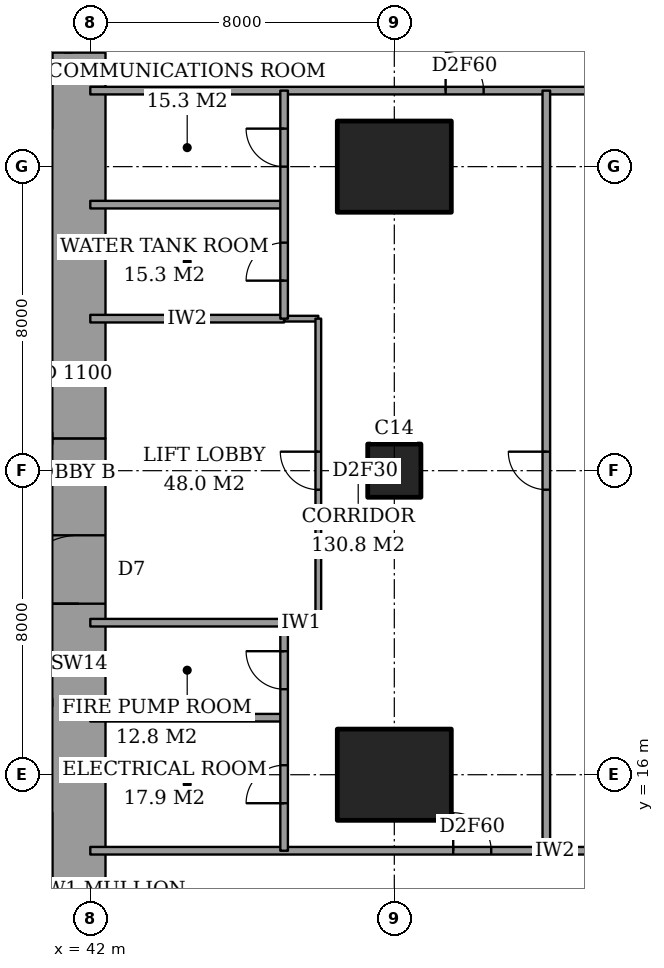
"""IFC4 building model, lengths in metres.
Left out: names, types, materials, properties, quantities, classifications, styles, units other than length and angle.
Written with IfcOpenShell. Run it as: python <this file> out.ifc"""

import sys

from ifc_helpers import new_model, si_unit, direction, frame, frame_2d, origin, origin_2d, place, context, subcontext, project, spatial, rectangle, extrude, element, fill, save


model = new_model("IFC4")
c1 = context("Model", 3, precision=1e-05, world=origin(), true_north=direction((0.0, 1.0)))
c2 = subcontext(c1, "Body", "Model", "MODEL_VIEW")
j1 = project(units=[si_unit("LENGTHUNIT", "METRE"), si_unit("PLANEANGLEUNIT", "RADIAN")], contexts=[c1])
p1 = place(None, origin())
s1 = spatial("IfcSite", under=j1, at=p1, CompositionType="ELEMENT")
p2 = place(p1, origin())
s2 = spatial("IfcBuilding", under=s1, at=p2, CompositionType="ELEMENT")
p3 = place(p2, frame((0.0, 0.0, 296.6)))
s3 = spatial("IfcBuildingStorey", under=s2, at=p3, CompositionType="ELEMENT", Elevation=296.6)
p4 = place(p3, frame((50.0, 16.0, 0.0), z_axis=(0.0, 0.0, 1.0), x_axis=(1.0, 0.0, 0.0)))
e1 = element("IfcColumn", 1, at=p4, inside=s3, PredefinedType="COLUMN", context=c2, shape_type="SweptSolid", body=[
    extrude(rectangle(XDim=3.0, YDim=2.4, at=origin_2d()), origin(), (0.0, 0.0, 1.0), 5.0),
])
p5 = place(p3, frame((50.0, 24.0, 0.0), z_axis=(0.0, 0.0, 1.0), x_axis=(1.0, 0.0, 0.0)))
e2 = element("IfcColumn", 2, at=p5, inside=s3, PredefinedType="COLUMN", context=c2, shape_type="SweptSolid", body=[
    extrude(rectangle(XDim=1.4, YDim=1.4, at=origin_2d()), origin(), (0.0, 0.0, 1.0), 5.0),
])
p6 = place(p3, frame((50.0, 32.0, 0.0), z_axis=(0.0, 0.0, 1.0), x_axis=(1.0, 0.0, 0.0)))
e3 = element("IfcColumn", 3, at=p6, inside=s3, PredefinedType="COLUMN", context=c2, shape_type="SweptSolid", body=[
    extrude(rectangle(XDim=3.0, YDim=2.4, at=origin_2d()), origin(), (0.0, 0.0, 1.0), 5.0),
])
p7 = place(p3, frame((41.7, 13.0, 0.0), z_axis=(0.0, 0.0, 1.0), x_axis=(0.0, 1.0, 0.0)))
e4 = element("IfcWall", 4, at=p7, inside=s3, PredefinedType="SHEAR", context=c2, shape_type="SweptSolid", body=[
    extrude(rectangle(XDim=11.85, YDim=1.4, at=frame_2d((5.925, 0.0))), origin(), (0.0, 0.0, 1.0), 5.0),
])
p8 = place(p7, frame((7.5, 0.0, 0.0)))
e5 = element("IfcOpeningElement", 5, at=p8, cuts=e4, PredefinedType="OPENING", context=c2, shape_type="SweptSolid", body=[
    extrude(rectangle(XDim=1.8, YDim=2.4, at=frame_2d((0.9, 1.2))), frame((0.0, 0.71, 0.0), z_axis=(0.0, -1.0, 0.0), x_axis=(1.0, 0.0, 0.0)), (0.0, 0.0, 1.0), 1.42),
])
p9 = place(p3, frame((41.7, 24.85, 0.0), z_axis=(0.0, 0.0, 1.0), x_axis=(0.0, 1.0, 0.0)))
e6 = element("IfcWall", 6, at=p9, inside=s3, PredefinedType="SHEAR", context=c2, shape_type="SweptSolid", body=[
    extrude(rectangle(XDim=10.15, YDim=1.4, at=frame_2d((5.075, 0.0))), origin(), (0.0, 0.0, 1.0), 5.0),
])
p10 = place(p3, frame((42.0, 14.0, 0.0), z_axis=(0.0, 0.0, 1.0), x_axis=(1.0, 0.0, 0.0)))
e7 = element("IfcWall", 7, at=p10, inside=s3, PredefinedType="PARTITIONING", context=c2, shape_type="SweptSolid", body=[
    extrude(rectangle(XDim=24.45, YDim=0.2, at=frame_2d((12.225, 0.0))), origin(), (0.0, 0.0, 1.0), 4.7),
])
p11 = place(p10, frame((9.55, 0.0, 0.0)))
e8 = element("IfcOpeningElement", 8, at=p11, cuts=e7, PredefinedType="OPENING", context=c2, shape_type="SweptSolid", body=[
    extrude(rectangle(XDim=1.0, YDim=2.1, at=frame_2d((0.5, 1.05))), frame((0.0, 0.11, 0.0), z_axis=(0.0, -1.0, 0.0), x_axis=(1.0, 0.0, 0.0)), (0.0, 0.0, 1.0), 0.22),
])
for number, where, z_axis, x_axis in (
    (9, (42.0, 17.5, 0.0), (0.0, 0.0, 1.0), (1.0, 0.0, 0.0)),
    (10, (42.0, 20.0, 0.0), (0.0, 0.0, 1.0), (1.0, 0.0, 0.0)),
):
    element("IfcWall", number, at=place(p3, frame(where, z_axis=z_axis, x_axis=x_axis)), inside=s3, PredefinedType="PARTITIONING", context=c2, shape_type="SweptSolid", body=[
        extrude(rectangle(XDim=5.1, YDim=0.2, at=frame_2d((2.55, 0.0))), origin(), (0.0, 0.0, 1.0), 4.7),
    ])
p12 = place(p3, frame((47.1, 20.0, 0.0), z_axis=(0.0, 0.0, 1.0), x_axis=(1.0, 0.0, 0.0)))
e11 = element("IfcWall", 11, at=p12, inside=s3, PredefinedType="PARTITIONING", context=c2, shape_type="SweptSolid", body=[
    extrude(rectangle(XDim=0.9, YDim=0.15, at=frame_2d((0.45, 0.0))), origin(), (0.0, 0.0, 1.0), 4.7),
])
p13 = place(p3, frame((42.0, 28.0, 0.0), z_axis=(0.0, 0.0, 1.0), x_axis=(1.0, 0.0, 0.0)))
e12 = element("IfcWall", 12, at=p13, inside=s3, PredefinedType="PARTITIONING", context=c2, shape_type="SweptSolid", body=[
    extrude(rectangle(XDim=5.1, YDim=0.2, at=frame_2d((2.55, 0.0))), origin(), (0.0, 0.0, 1.0), 4.7),
])
p14 = place(p3, frame((47.1, 28.0, 0.0), z_axis=(0.0, 0.0, 1.0), x_axis=(1.0, 0.0, 0.0)))
e13 = element("IfcWall", 13, at=p14, inside=s3, PredefinedType="PARTITIONING", context=c2, shape_type="SweptSolid", body=[
    extrude(rectangle(XDim=0.9, YDim=0.15, at=frame_2d((0.45, 0.0))), origin(), (0.0, 0.0, 1.0), 4.7),
])
p15 = place(p3, frame((42.0, 31.0, 0.0), z_axis=(0.0, 0.0, 1.0), x_axis=(1.0, 0.0, 0.0)))
e14 = element("IfcWall", 14, at=p15, inside=s3, PredefinedType="PARTITIONING", context=c2, shape_type="SweptSolid", body=[
    extrude(rectangle(XDim=5.1, YDim=0.2, at=frame_2d((2.55, 0.0))), origin(), (0.0, 0.0, 1.0), 4.7),
])
p16 = place(p3, frame((42.0, 34.0, 0.0), z_axis=(0.0, 0.0, 1.0), x_axis=(1.0, 0.0, 0.0)))
e15 = element("IfcWall", 15, at=p16, inside=s3, PredefinedType="PARTITIONING", context=c2, shape_type="SweptSolid", body=[
    extrude(rectangle(XDim=24.45, YDim=0.2, at=frame_2d((12.225, 0.0))), origin(), (0.0, 0.0, 1.0), 4.7),
])
p17 = place(p16, frame((9.35, 0.0, 0.0)))
e16 = element("IfcOpeningElement", 16, at=p17, cuts=e15, PredefinedType="OPENING", context=c2, shape_type="SweptSolid", body=[
    extrude(rectangle(XDim=1.0, YDim=2.1, at=frame_2d((0.5, 1.05))), frame((0.0, 0.11, 0.0), z_axis=(0.0, -1.0, 0.0), x_axis=(1.0, 0.0, 0.0)), (0.0, 0.0, 1.0), 0.22),
])
p18 = place(p3, frame((47.1, 14.0, 0.0), z_axis=(0.0, 0.0, 1.0), x_axis=(0.0, 1.0, 0.0)))
e17 = element("IfcWall", 17, at=p18, inside=s3, PredefinedType="PARTITIONING", context=c2, shape_type="SweptSolid", body=[
    extrude(rectangle(XDim=6.0, YDim=0.2, at=frame_2d((3.0, 0.0))), origin(), (0.0, 0.0, 1.0), 4.7),
])
p19 = place(p18, frame((1.25, 0.0, 0.0)))
e18 = element("IfcOpeningElement", 18, at=p19, cuts=e17, PredefinedType="OPENING", context=c2, shape_type="SweptSolid", body=[
    extrude(rectangle(XDim=1.0, YDim=2.1, at=frame_2d((0.5, 1.05))), frame((0.0, 0.11, 0.0), z_axis=(0.0, -1.0, 0.0), x_axis=(1.0, 0.0, 0.0)), (0.0, 0.0, 1.0), 0.22),
])
p20 = place(p18, frame((4.25, 0.0, 0.0)))
e19 = element("IfcOpeningElement", 19, at=p20, cuts=e17, PredefinedType="OPENING", context=c2, shape_type="SweptSolid", body=[
    extrude(rectangle(XDim=1.0, YDim=2.1, at=frame_2d((0.5, 1.05))), frame((0.0, 0.11, 0.0), z_axis=(0.0, -1.0, 0.0), x_axis=(1.0, 0.0, 0.0)), (0.0, 0.0, 1.0), 0.22),
])
p21 = place(p3, frame((47.1, 28.0, 0.0), z_axis=(0.0, 0.0, 1.0), x_axis=(0.0, 1.0, 0.0)))
e20 = element("IfcWall", 20, at=p21, inside=s3, PredefinedType="PARTITIONING", context=c2, shape_type="SweptSolid", body=[
    extrude(rectangle(XDim=6.0, YDim=0.2, at=frame_2d((3.0, 0.0))), origin(), (0.0, 0.0, 1.0), 4.7),
])
p22 = place(p21, frame((1.0, 0.0, 0.0)))
e21 = element("IfcOpeningElement", 21, at=p22, cuts=e20, PredefinedType="OPENING", context=c2, shape_type="SweptSolid", body=[
    extrude(rectangle(XDim=1.0, YDim=2.1, at=frame_2d((0.5, 1.05))), frame((0.0, 0.11, 0.0), z_axis=(0.0, -1.0, 0.0), x_axis=(1.0, 0.0, 0.0)), (0.0, 0.0, 1.0), 0.22),
])
p23 = place(p21, frame((4.0, 0.0, 0.0)))
e22 = element("IfcOpeningElement", 22, at=p23, cuts=e20, PredefinedType="OPENING", context=c2, shape_type="SweptSolid", body=[
    extrude(rectangle(XDim=1.0, YDim=2.1, at=frame_2d((0.5, 1.05))), frame((0.0, 0.11, 0.0), z_axis=(0.0, -1.0, 0.0), x_axis=(1.0, 0.0, 0.0)), (0.0, 0.0, 1.0), 0.22),
])
p24 = place(p3, frame((48.0, 20.0, 0.0), z_axis=(0.0, 0.0, 1.0), x_axis=(0.0, 1.0, 0.0)))
e23 = element("IfcWall", 23, at=p24, inside=s3, PredefinedType="PARTITIONING", context=c2, shape_type="SweptSolid", body=[
    extrude(rectangle(XDim=8.0, YDim=0.15, at=frame_2d((4.0, 0.0))), origin(), (0.0, 0.0, 1.0), 4.7),
])
p25 = place(p24, frame((3.5, 0.0, 0.0)))
e24 = element("IfcOpeningElement", 24, at=p25, cuts=e23, PredefinedType="OPENING", context=c2, shape_type="SweptSolid", body=[
    extrude(rectangle(XDim=1.0, YDim=2.1, at=frame_2d((0.5, 1.05))), frame((0.0, 0.085, 0.0), z_axis=(0.0, -1.0, 0.0), x_axis=(1.0, 0.0, 0.0)), (0.0, 0.0, 1.0), 0.17),
])
p26 = place(p3, frame((54.0, 14.0, 0.0), z_axis=(0.0, 0.0, 1.0), x_axis=(0.0, 1.0, 0.0)))
e25 = element("IfcWall", 25, at=p26, inside=s3, PredefinedType="PARTITIONING", context=c2, shape_type="SweptSolid", body=[
    extrude(rectangle(XDim=20.0, YDim=0.2, at=frame_2d((10.0, 0.0))), origin(), (0.0, 0.0, 1.0), 4.7),
])
p27 = place(p26, frame((9.5, 0.0, 0.0)))
e26 = element("IfcOpeningElement", 26, at=p27, cuts=e25, PredefinedType="OPENING", context=c2, shape_type="SweptSolid", body=[
    extrude(rectangle(XDim=1.0, YDim=2.1, at=frame_2d((0.5, 1.05))), frame((0.0, 0.11, 0.0), z_axis=(0.0, -1.0, 0.0), x_axis=(1.0, 0.0, 0.0)), (0.0, 0.0, 1.0), 0.22),
])
p28 = place(p3, frame((28.3, 17.9, 0.0), z_axis=(0.0, 0.0, 1.0), x_axis=(1.0, 0.0, 0.0)))
e27 = element("IfcWall", 27, at=p28, inside=s3, PredefinedType="PARTITIONING", context=c2, shape_type="SweptSolid", body=[
    extrude(rectangle(XDim=12.7, YDim=0.2, at=frame_2d((6.35, 0.0))), origin(), (0.0, 0.0, 1.0), 5.0),
])
p29 = place(p28, frame((1.05, 0.0, 0.0)))
e28 = element("IfcOpeningElement", 28, at=p29, cuts=e27, PredefinedType="OPENING", context=c2, shape_type="SweptSolid", body=[
    extrude(rectangle(XDim=0.9, YDim=2.1, at=frame_2d((0.45, 1.05))), frame((0.0, 0.11, 0.0), z_axis=(0.0, -1.0, 0.0), x_axis=(1.0, 0.0, 0.0)), (0.0, 0.0, 1.0), 0.22),
])
p30 = place(p28, frame((7.4, 0.0, 0.0)))
e29 = element("IfcOpeningElement", 29, at=p30, cuts=e27, PredefinedType="OPENING", context=c2, shape_type="SweptSolid", body=[
    extrude(rectangle(XDim=1.0, YDim=2.1, at=frame_2d((0.5, 1.05))), frame((0.0, 0.11, 0.0), z_axis=(0.0, -1.0, 0.0), x_axis=(1.0, 0.0, 0.0)), (0.0, 0.0, 1.0), 0.22),
])
p31 = place(p28, frame((10.6, 0.0, 0.0)))
e30 = element("IfcOpeningElement", 30, at=p31, cuts=e27, PredefinedType="OPENING", context=c2, shape_type="SweptSolid", body=[
    extrude(rectangle(XDim=1.2, YDim=2.1, at=frame_2d((0.6, 1.05))), frame((0.0, 0.11, 0.0), z_axis=(0.0, -1.0, 0.0), x_axis=(1.0, 0.0, 0.0)), (0.0, 0.0, 1.0), 0.22),
])
p32 = place(p11, origin())
e31 = element("IfcDoor", 31, at=p32, inside=s3, OperationType="SINGLE_SWING_RIGHT", PredefinedType="DOOR", context=c2, shape_type="SweptSolid", body=[
    extrude(rectangle(XDim=1.0, YDim=2.1, at=frame_2d((0.5, 1.05))), frame((0.0, 0.025, 0.0), z_axis=(0.0, -1.0, 0.0), x_axis=(1.0, 0.0, 0.0)), (0.0, 0.0, 1.0), 0.05),
])
fill(e8, e31)
p33 = place(p27, origin())
e32 = element("IfcDoor", 32, at=p33, inside=s3, OperationType="SINGLE_SWING_LEFT", PredefinedType="DOOR", context=c2, shape_type="SweptSolid", body=[
    extrude(rectangle(XDim=1.0, YDim=2.1, at=frame_2d((0.5, 1.05))), frame((0.0, 0.025, 0.0), z_axis=(0.0, -1.0, 0.0), x_axis=(1.0, 0.0, 0.0)), (0.0, 0.0, 1.0), 0.05),
])
fill(e26, e32)
p34 = place(p17, origin())
e33 = element("IfcDoor", 33, at=p34, inside=s3, OperationType="SINGLE_SWING_RIGHT", PredefinedType="DOOR", context=c2, shape_type="SweptSolid", body=[
    extrude(rectangle(XDim=1.0, YDim=2.1, at=frame_2d((0.5, 1.05))), frame((0.0, 0.025, 0.0), z_axis=(0.0, -1.0, 0.0), x_axis=(1.0, 0.0, 0.0)), (0.0, 0.0, 1.0), 0.05),
])
fill(e16, e33)
p35 = place(p25, origin())
e34 = element("IfcDoor", 34, at=p35, inside=s3, OperationType="SINGLE_SWING_LEFT", PredefinedType="DOOR", context=c2, shape_type="SweptSolid", body=[
    extrude(rectangle(XDim=1.0, YDim=2.1, at=frame_2d((0.5, 1.05))), frame((0.0, 0.025, 0.0), z_axis=(0.0, -1.0, 0.0), x_axis=(1.0, 0.0, 0.0)), (0.0, 0.0, 1.0), 0.05),
])
fill(e24, e34)
p36 = place(p19, origin())
e35 = element("IfcDoor", 35, at=p36, inside=s3, OperationType="SINGLE_SWING_RIGHT", PredefinedType="DOOR", context=c2, shape_type="SweptSolid", body=[
    extrude(rectangle(XDim=1.0, YDim=2.1, at=frame_2d((0.5, 1.05))), frame((0.0, 0.025, 0.0), z_axis=(0.0, -1.0, 0.0), x_axis=(1.0, 0.0, 0.0)), (0.0, 0.0, 1.0), 0.05),
])
fill(e18, e35)
p37 = place(p20, origin())
e36 = element("IfcDoor", 36, at=p37, inside=s3, OperationType="SINGLE_SWING_LEFT", PredefinedType="DOOR", context=c2, shape_type="SweptSolid", body=[
    extrude(rectangle(XDim=1.0, YDim=2.1, at=frame_2d((0.5, 1.05))), frame((0.0, 0.025, 0.0), z_axis=(0.0, -1.0, 0.0), x_axis=(1.0, 0.0, 0.0)), (0.0, 0.0, 1.0), 0.05),
])
fill(e19, e36)
p38 = place(p22, origin())
e37 = element("IfcDoor", 37, at=p38, inside=s3, OperationType="SINGLE_SWING_RIGHT", PredefinedType="DOOR", context=c2, shape_type="SweptSolid", body=[
    extrude(rectangle(XDim=1.0, YDim=2.1, at=frame_2d((0.5, 1.05))), frame((0.0, 0.025, 0.0), z_axis=(0.0, -1.0, 0.0), x_axis=(1.0, 0.0, 0.0)), (0.0, 0.0, 1.0), 0.05),
])
fill(e21, e37)
p39 = place(p23, origin())
e38 = element("IfcDoor", 38, at=p39, inside=s3, OperationType="SINGLE_SWING_LEFT", PredefinedType="DOOR", context=c2, shape_type="SweptSolid", body=[
    extrude(rectangle(XDim=1.0, YDim=2.1, at=frame_2d((0.5, 1.05))), frame((0.0, 0.025, 0.0), z_axis=(0.0, -1.0, 0.0), x_axis=(1.0, 0.0, 0.0)), (0.0, 0.0, 1.0), 0.05),
])
fill(e22, e38)
p40 = place(p8, origin())
e39 = element("IfcDoor", 39, at=p40, inside=s3, OperationType="DOUBLE_DOOR_DOUBLE_SWING", PredefinedType="DOOR", context=c2, shape_type="SweptSolid", body=[
    extrude(rectangle(XDim=1.8, YDim=2.4, at=frame_2d((0.9, 1.2))), frame((0.0, 0.025, 0.0), z_axis=(0.0, -1.0, 0.0), x_axis=(1.0, 0.0, 0.0)), (0.0, 0.0, 1.0), 0.05),
])
fill(e5, e39)
save(model, sys.argv[1])
